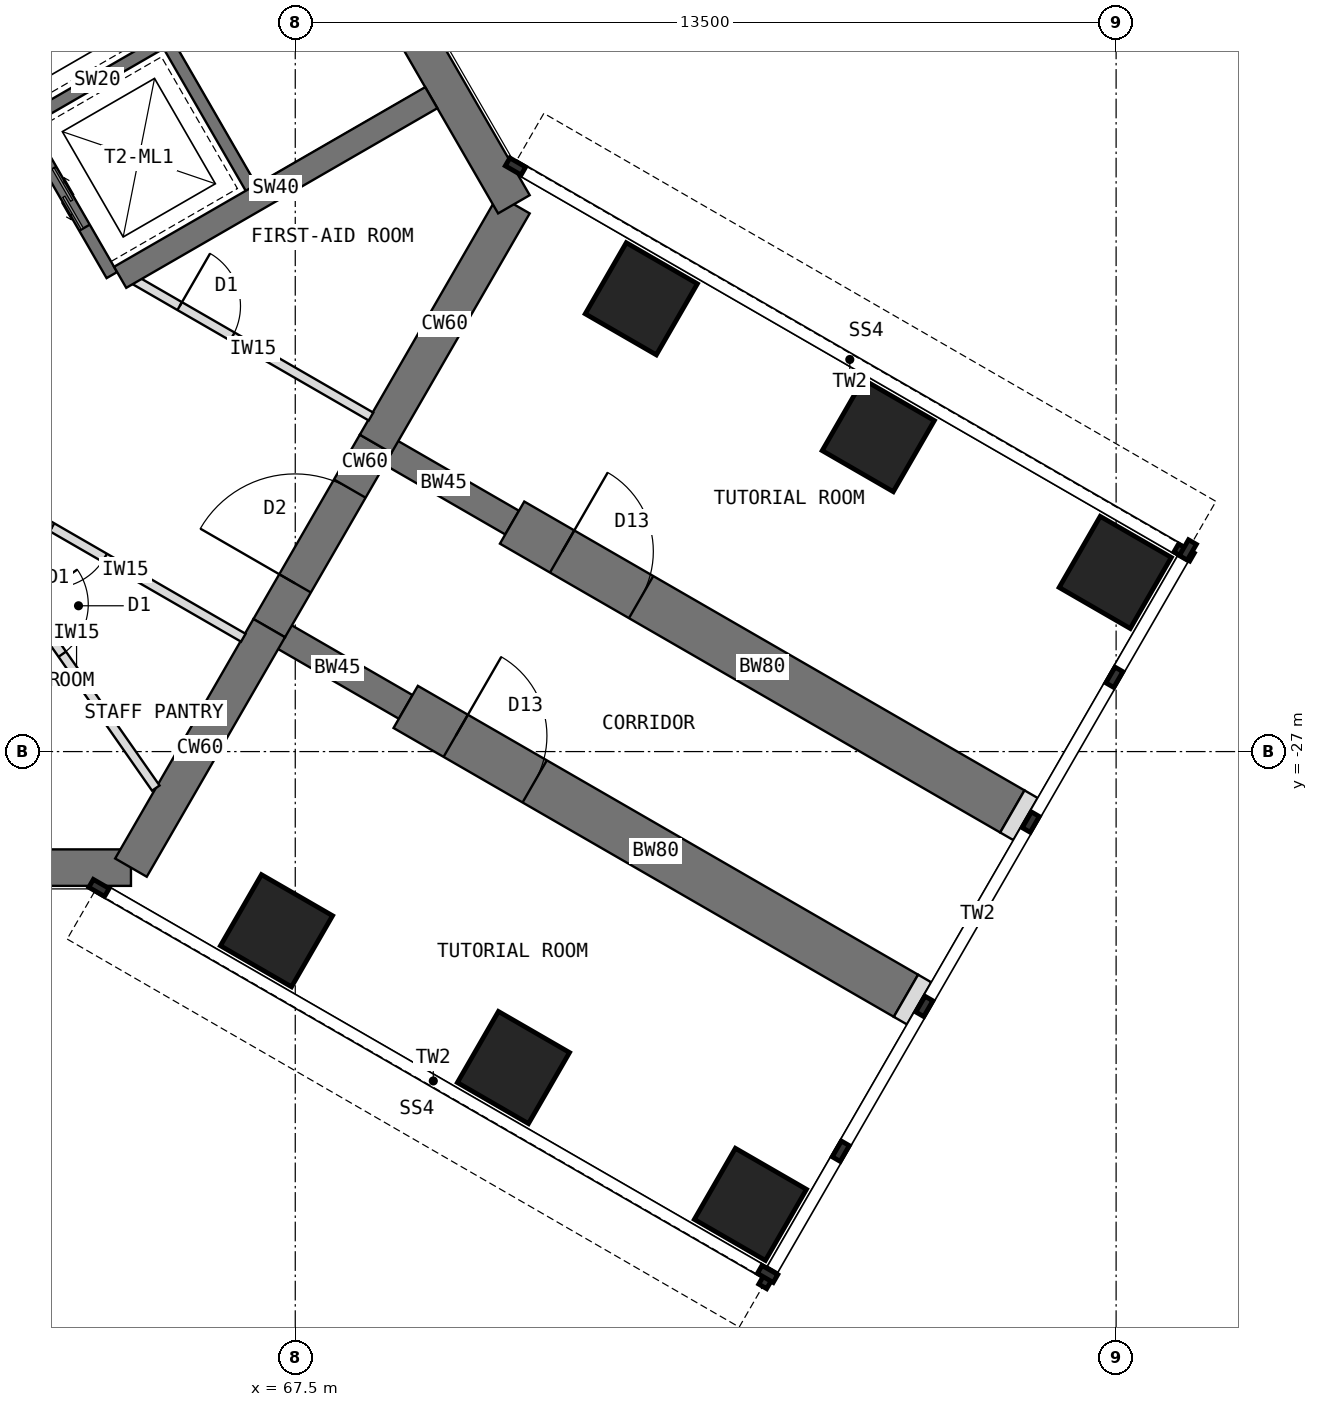
"""IFC4 building model, lengths in metres.
Left out: names, types, materials, properties, quantities, classifications, styles, units other than length and angle.
Written with IfcOpenShell. Run it as: python <this file> out.ifc"""

import sys

from ifc_helpers import new_model, si_unit, direction, frame, frame_2d, origin, origin_2d, place, context, subcontext, project, spatial, rectangle, extrude, element, fill, save


model = new_model("IFC4")
c1 = context("Model", 3, precision=1e-05, world=origin(), true_north=direction((0.0, 1.0)))
c2 = subcontext(c1, "Body", "Model", "MODEL_VIEW")
j1 = project(units=[si_unit("LENGTHUNIT", "METRE"), si_unit("PLANEANGLEUNIT", "RADIAN")], contexts=[c1])
p1 = place(None, origin())
s1 = spatial("IfcSite", under=j1, at=p1, CompositionType="ELEMENT")
p2 = place(p1, origin())
s2 = spatial("IfcBuilding", under=s1, at=p2, CompositionType="ELEMENT")
p3 = place(p2, frame((0.0, 0.0, 113.5)))
s3 = spatial("IfcBuildingStorey", under=s2, at=p3, CompositionType="ELEMENT", Elevation=113.5)
p4 = place(p3, frame((52.202, -28.908, 0.0), z_axis=(0.0, 0.0, 1.0), x_axis=(1.0, 0.0, 0.0)))
e1 = element("IfcWall", 1, at=p4, inside=s3, PredefinedType="SHEAR", context=c2, shape_type="SweptSolid", body=[
    extrude(rectangle(XDim=12.596, YDim=0.6, at=frame_2d((6.298, 0.0))), origin(), (0.0, 0.0, 1.0), 4.0),
])
p5 = place(p3, frame((64.798, -28.908, 0.0), z_axis=(0.0, 0.0, 1.0), x_axis=(0.499984222037, 0.866034513004, 0.0)))
e2 = element("IfcWall", 2, at=p5, inside=s3, PredefinedType="SHEAR", context=c2, shape_type="SweptSolid", body=[
    extrude(rectangle(XDim=4.548, YDim=0.6, at=frame_2d((2.274, 0.0))), origin(), (0.0, 0.0, 1.0), 4.0),
])
p6 = place(p3, frame((67.072, -24.97, 0.0), z_axis=(0.0, 0.0, 1.0), x_axis=(0.500010275428, 0.866019471182, 0.0)))
e3 = element("IfcWall", 3, at=p6, inside=s3, PredefinedType="SHEAR", context=c2, shape_type="SweptSolid", body=[
    extrude(rectangle(XDim=3.5, YDim=0.6, at=frame_2d((1.75, 0.0))), origin(), (0.0, 0.0, 1.0), 4.0),
])
p7 = place(p6, frame((0.85, 0.0, 0.0)))
e4 = element("IfcOpeningElement", 4, at=p7, cuts=e3, PredefinedType="OPENING", context=c2, shape_type="SweptSolid", body=[
    extrude(rectangle(XDim=1.8, YDim=2.1, at=frame_2d((0.9, 1.05))), frame((0.0, 0.31, 0.0), z_axis=(0.0, -1.0, 0.0), x_axis=(1.0, 0.0, 0.0)), (0.0, 0.0, 1.0), 0.62),
])
p8 = place(p3, frame((68.822, -21.939, 0.0), z_axis=(0.0, 0.0, 1.0), x_axis=(0.500024481964, 0.866011268655, 0.0)))
e5 = element("IfcWall", 5, at=p8, inside=s3, PredefinedType="SHEAR", context=c2, shape_type="SweptSolid", body=[
    extrude(rectangle(XDim=4.548, YDim=0.6, at=frame_2d((2.274, 0.0))), origin(), (0.0, 0.0, 1.0), 4.0),
])
p9 = place(p3, frame((71.096, -18.0, 0.0), z_axis=(0.0, 0.0, 1.0), x_axis=(-0.500005998175, 0.866021940709, 0.0)))
e6 = element("IfcWall", 6, at=p9, inside=s3, PredefinedType="SHEAR", context=c2, shape_type="SweptSolid", body=[
    extrude(rectangle(XDim=12.596, YDim=0.6, at=frame_2d((6.298, 0.0))), origin(), (0.0, 0.0, 1.0), 4.0),
])
p10 = place(p3, frame((68.822, -21.939, 0.0), z_axis=(0.0, 0.0, 1.0), x_axis=(0.866072649678, -0.499918158782, 0.0)))
e7 = element("IfcWall", 7, at=p10, inside=s3, PredefinedType="SHEAR", context=c2, shape_type="SweptSolid", body=[
    extrude(rectangle(XDim=2.592, YDim=0.45, at=frame_2d((1.296, 0.0))), origin(), (0.0, 0.0, 1.0), 4.0),
])
p11 = place(p3, frame((71.066, -23.234, 0.0), z_axis=(0.0, 0.0, 1.0), x_axis=(0.86602681393, -0.499997557548, 0.0)))
e8 = element("IfcWall", 8, at=p11, inside=s3, PredefinedType="SHEAR", context=c2, shape_type="SweptSolid", body=[
    extrude(rectangle(XDim=9.5, YDim=0.8, at=frame_2d((4.75, 0.0))), origin(), (0.0, 0.0, 1.0), 4.0),
])
p12 = place(p11, frame((0.95, 0.0, 0.0)))
e9 = element("IfcOpeningElement", 9, at=p12, cuts=e8, PredefinedType="OPENING", context=c2, shape_type="SweptSolid", body=[
    extrude(rectangle(XDim=1.5, YDim=2.1, at=frame_2d((0.75, 1.05))), frame((0.0, 0.41, 0.0), z_axis=(0.0, -1.0, 0.0), x_axis=(1.0, 0.0, 0.0)), (0.0, 0.0, 1.0), 0.82),
])
p13 = place(p3, frame((67.072, -24.97, 0.0), z_axis=(0.0, 0.0, 1.0), x_axis=(0.866031863473, -0.499988811324, 0.0)))
e10 = element("IfcWall", 10, at=p13, inside=s3, PredefinedType="SHEAR", context=c2, shape_type="SweptSolid", body=[
    extrude(rectangle(XDim=2.592, YDim=0.45, at=frame_2d((1.296, 0.0))), origin(), (0.0, 0.0, 1.0), 4.0),
])
p14 = place(p3, frame((69.316, -26.266, 0.0), z_axis=(0.0, 0.0, 1.0), x_axis=(0.86602681393, -0.499997557548, 0.0)))
e11 = element("IfcWall", 11, at=p14, inside=s3, PredefinedType="SHEAR", context=c2, shape_type="SweptSolid", body=[
    extrude(rectangle(XDim=9.5, YDim=0.8, at=frame_2d((4.75, 0.0))), origin(), (0.0, 0.0, 1.0), 4.0),
])
p15 = place(p14, frame((0.95, 0.0, 0.0)))
e12 = element("IfcOpeningElement", 12, at=p15, cuts=e11, PredefinedType="OPENING", context=c2, shape_type="SweptSolid", body=[
    extrude(rectangle(XDim=1.5, YDim=2.1, at=frame_2d((0.75, 1.05))), frame((0.0, 0.41, 0.0), z_axis=(0.0, -1.0, 0.0), x_axis=(1.0, 0.0, 0.0)), (0.0, 0.0, 1.0), 0.82),
])
for number, where, z_axis, x_axis in (
    (13, (73.191, -19.554, 0.0), (0.0, 0.0, 1.0), (0.5, 0.866, 0.0)),
    (14, (67.191, -29.946, 0.0), (0.0, 0.0, 1.0), (0.5, 0.866, 0.0)),
    (15, (77.088, -21.804, 0.0), (0.0, 0.0, 1.0), (0.5, 0.866, 0.0)),
    (16, (71.088, -32.196, 0.0), (0.0, 0.0, 1.0), (0.5, 0.866, 0.0)),
    (17, (80.986, -24.054, 0.0), (0.0, 0.0, 1.0), (0.5, 0.866, 0.0)),
    (18, (74.986, -34.446, 0.0), (0.0, 0.0, 1.0), (0.5, 0.866, 0.0)),
):
    element("IfcColumn", number, at=place(p3, frame(where, z_axis=z_axis, x_axis=x_axis)), inside=s3, PredefinedType="COLUMN", context=c2, shape_type="SweptSolid", body=[
        extrude(rectangle(XDim=1.35, YDim=1.35, at=origin_2d()), origin(), (0.0, 0.0, 1.0), 4.0),
    ])
for number, where, z_axis, x_axis in (
    (19, (79.294, -27.984, 0.0), (0.0, 0.0, 1.0), (0.866, -0.5, 0.0)),
    (20, (77.544, -31.016, 0.0), (0.0, 0.0, 1.0), (0.866, -0.5, 0.0)),
):
    element("IfcWall", number, at=place(p3, frame(where, z_axis=z_axis, x_axis=x_axis)), inside=s3, PredefinedType="PARTITIONING", context=c2, shape_type="SweptSolid", body=[
        extrude(rectangle(XDim=0.25, YDim=0.8, at=frame_2d((0.125, 0.0))), origin(), (0.0, 0.0, 1.0), 3.8),
    ])
p16 = place(p3, frame((64.484, -19.164, 0.0), z_axis=(0.0, 0.0, 1.0), x_axis=(-0.49999894854, 0.866026010844, 0.0)))
e21 = element("IfcWall", 21, at=p16, inside=s3, PredefinedType="SHEAR", context=c2, shape_type="SweptSolid", body=[
    extrude(rectangle(XDim=8.0, YDim=0.2, at=frame_2d((4.0, 0.0))), origin(), (0.0, 0.0, 1.0), 4.0),
])
p17 = place(p16, frame((6.3, 0.0, 0.0)))
e22 = element("IfcOpeningElement", 22, at=p17, cuts=e21, PredefinedType="OPENING", context=c2, shape_type="SweptSolid", body=[
    extrude(rectangle(XDim=1.2, YDim=2.1, at=frame_2d((0.6, 1.05))), frame((0.0, 0.11, 0.0), z_axis=(0.0, -1.0, 0.0), x_axis=(1.0, 0.0, 0.0)), (0.0, 0.0, 1.0), 0.22),
])
p18 = place(p16, frame((0.9, 0.0, 0.0)))
e23 = element("IfcOpeningElement", 23, at=p18, cuts=e21, PredefinedType="OPENING", context=c2, shape_type="SweptSolid", body=[
    extrude(rectangle(XDim=1.1, YDim=2.2, at=frame_2d((0.55, 1.1))), frame((0.0, 0.11, 0.0), z_axis=(0.0, -1.0, 0.0), x_axis=(1.0, 0.0, 0.0)), (0.0, 0.0, 1.0), 0.22),
])
p19 = place(p16, frame((3.8, 0.0, 0.0)))
e24 = element("IfcOpeningElement", 24, at=p19, cuts=e21, PredefinedType="OPENING", context=c2, shape_type="SweptSolid", body=[
    extrude(rectangle(XDim=1.1, YDim=2.2, at=frame_2d((0.55, 1.1))), frame((0.0, 0.11, 0.0), z_axis=(0.0, -1.0, 0.0), x_axis=(1.0, 0.0, 0.0)), (0.0, 0.0, 1.0), 0.22),
])
p20 = place(p3, frame((63.12, -16.603, 0.0), z_axis=(0.0, 0.0, 1.0), x_axis=(0.866062058628, 0.499936506574, 0.0)))
e25 = element("IfcWall", 25, at=p20, inside=s3, PredefinedType="SHEAR", context=c2, shape_type="SweptSolid", body=[
    extrude(rectangle(XDim=2.6, YDim=0.2, at=frame_2d((1.3, 0.0))), origin(), (0.0, 0.0, 1.0), 4.0),
])
p21 = place(p3, frame((66.822, -17.814, 0.0), z_axis=(0.0, 0.0, 1.0), x_axis=(-0.49999894854, 0.866026010844, 0.0)))
e26 = element("IfcWall", 26, at=p21, inside=s3, PredefinedType="SHEAR", context=c2, shape_type="SweptSolid", body=[
    extrude(rectangle(XDim=8.0, YDim=0.2, at=frame_2d((4.0, 0.0))), origin(), (0.0, 0.0, 1.0), 4.0),
])
p22 = place(p21, frame((6.7, 0.0, 0.0)))
e27 = element("IfcOpeningElement", 27, at=p22, cuts=e26, PredefinedType="OPENING", context=c2, shape_type="SweptSolid", body=[
    extrude(rectangle(XDim=1.1, YDim=2.1, at=frame_2d((0.55, 1.05))), frame((0.0, 0.11, 0.0), z_axis=(0.0, -1.0, 0.0), x_axis=(1.0, 0.0, 0.0)), (0.0, 0.0, 1.0), 0.22),
])
p23 = place(p3, frame((64.62, -19.201, 0.0), z_axis=(0.0, 0.0, 1.0), x_axis=(0.866027317282, 0.49999668571, 0.0)))
e28 = element("IfcWall", 28, at=p23, inside=s3, PredefinedType="SHEAR", context=c2, shape_type="SweptSolid", body=[
    extrude(rectangle(XDim=5.908, YDim=0.4, at=frame_2d((2.954, 0.0))), origin(), (0.0, 0.0, 1.0), 4.0),
])
p24 = place(p3, frame((64.87, -19.253, 0.0), z_axis=(0.0, 0.0, 1.0), x_axis=(0.866025707867, -0.499999473313, 0.0)))
e29 = element("IfcWall", 29, at=p24, inside=s3, PredefinedType="PARTITIONING", context=c2, shape_type="SweptSolid", body=[
    extrude(rectangle(XDim=4.476, YDim=0.15, at=frame_2d((2.238, 0.0))), origin(), (0.0, 0.0, 1.0), 3.8),
])
p25 = place(p24, frame((0.843, 0.0, 0.0)))
e30 = element("IfcOpeningElement", 30, at=p25, cuts=e29, PredefinedType="OPENING", context=c2, shape_type="SweptSolid", body=[
    extrude(rectangle(XDim=1.0, YDim=2.1, at=frame_2d((0.5, 1.05))), frame((0.0, 0.085, 0.0), z_axis=(0.0, -1.0, 0.0), x_axis=(1.0, 0.0, 0.0)), (0.0, 0.0, 1.0), 0.17),
])
p26 = place(p3, frame((66.646, -25.128, 0.0), z_axis=(0.0, 0.0, 1.0), x_axis=(-0.866025707867, 0.499999473313, 0.0)))
e31 = element("IfcWall", 31, at=p26, inside=s3, PredefinedType="PARTITIONING", context=c2, shape_type="SweptSolid", body=[
    extrude(rectangle(XDim=4.476, YDim=0.15, at=frame_2d((2.238, 0.0))), origin(), (0.0, 0.0, 1.0), 3.8),
])
p27 = place(p26, frame((2.633, 0.0, 0.0)))
e32 = element("IfcOpeningElement", 32, at=p27, cuts=e31, PredefinedType="OPENING", context=c2, shape_type="SweptSolid", body=[
    extrude(rectangle(XDim=1.0, YDim=2.1, at=frame_2d((0.5, 1.05))), frame((0.0, 0.085, 0.0), z_axis=(0.0, -1.0, 0.0), x_axis=(1.0, 0.0, 0.0)), (0.0, 0.0, 1.0), 0.17),
])
p28 = place(p3, frame((62.6, -23.869, 0.0), z_axis=(0.0, 0.0, 1.0), x_axis=(0.572666465836, -0.819788459852, 0.0)))
e33 = element("IfcWall", 33, at=p28, inside=s3, PredefinedType="PARTITIONING", context=c2, shape_type="SweptSolid", body=[
    extrude(rectangle(XDim=4.552, YDim=0.15, at=frame_2d((2.276, 0.0))), origin(), (0.0, 0.0, 1.0), 3.8),
])
p29 = place(p28, frame((0.865, 0.0, 0.0)))
e34 = element("IfcOpeningElement", 34, at=p29, cuts=e33, PredefinedType="OPENING", context=c2, shape_type="SweptSolid", body=[
    extrude(rectangle(XDim=1.0, YDim=2.1, at=frame_2d((0.5, 1.05))), frame((0.0, 0.085, 0.0), z_axis=(0.0, -1.0, 0.0), x_axis=(1.0, 0.0, 0.0)), (0.0, 0.0, 1.0), 0.17),
])
p30 = place(p18, origin())
e35 = element("IfcDoor", 35, at=p30, inside=s3, OperationType="DOUBLE_DOOR_SLIDING", PredefinedType="DOOR", context=c2, shape_type="SweptSolid", body=[
    extrude(rectangle(XDim=1.1, YDim=2.2, at=frame_2d((0.55, 1.1))), frame((0.0, 0.025, 0.0), z_axis=(0.0, -1.0, 0.0), x_axis=(1.0, 0.0, 0.0)), (0.0, 0.0, 1.0), 0.05),
])
fill(e23, e35)
p31 = place(p7, origin())
e36 = element("IfcDoor", 36, at=p31, inside=s3, OperationType="DOUBLE_DOOR_DOUBLE_SWING", PredefinedType="DOOR", context=c2, shape_type="SweptSolid", body=[
    extrude(rectangle(XDim=1.72, YDim=2.06, at=frame_2d((0.9, 1.03))), frame((0.0, 0.025, 0.0), z_axis=(0.0, -1.0, 0.0), x_axis=(1.0, 0.0, 0.0)), (0.0, 0.0, 1.0), 0.05),
    extrude(rectangle(XDim=0.04, YDim=2.1, at=frame_2d((0.02, 1.05))), frame((0.0, 0.3, 0.0), z_axis=(0.0, -1.0, 0.0), x_axis=(1.0, 0.0, 0.0)), (0.0, 0.0, 1.0), 0.6),
    extrude(rectangle(XDim=0.04, YDim=2.1, at=frame_2d((1.78, 1.05))), frame((0.0, 0.3, 0.0), z_axis=(0.0, -1.0, 0.0), x_axis=(1.0, 0.0, 0.0)), (0.0, 0.0, 1.0), 0.6),
    extrude(rectangle(XDim=1.72, YDim=0.04, at=frame_2d((0.9, 2.08))), frame((0.0, 0.3, 0.0), z_axis=(0.0, -1.0, 0.0), x_axis=(1.0, 0.0, 0.0)), (0.0, 0.0, 1.0), 0.6),
])
fill(e4, e36)
p32 = place(p29, origin())
e37 = element("IfcDoor", 37, at=p32, inside=s3, OperationType="SINGLE_SWING_LEFT", PredefinedType="DOOR", context=c2, shape_type="SweptSolid", body=[
    extrude(rectangle(XDim=1.0, YDim=2.1, at=frame_2d((0.5, 1.05))), frame((0.0, 0.025, 0.0), z_axis=(0.0, -1.0, 0.0), x_axis=(1.0, 0.0, 0.0)), (0.0, 0.0, 1.0), 0.05),
])
fill(e34, e37)
p33 = place(p27, origin())
e38 = element("IfcDoor", 38, at=p33, inside=s3, OperationType="SINGLE_SWING_RIGHT", PredefinedType="DOOR", context=c2, shape_type="SweptSolid", body=[
    extrude(rectangle(XDim=1.0, YDim=2.1, at=frame_2d((0.5, 1.05))), frame((0.0, 0.025, 0.0), z_axis=(0.0, -1.0, 0.0), x_axis=(1.0, 0.0, 0.0)), (0.0, 0.0, 1.0), 0.05),
])
fill(e32, e38)
p34 = place(p25, origin())
e39 = element("IfcDoor", 39, at=p34, inside=s3, OperationType="SINGLE_SWING_LEFT", PredefinedType="DOOR", context=c2, shape_type="SweptSolid", body=[
    extrude(rectangle(XDim=1.0, YDim=2.1, at=frame_2d((0.5, 1.05))), frame((0.0, 0.025, 0.0), z_axis=(0.0, -1.0, 0.0), x_axis=(1.0, 0.0, 0.0)), (0.0, 0.0, 1.0), 0.05),
])
fill(e30, e39)
p35 = place(p12, origin())
e40 = element("IfcDoor", 40, at=p35, inside=s3, OperationType="DOUBLE_DOOR_SINGLE_SWING", PredefinedType="DOOR", context=c2, shape_type="SweptSolid", body=[
    extrude(rectangle(XDim=1.42, YDim=2.06, at=frame_2d((0.75, 1.03))), frame((0.0, 0.025, 0.0), z_axis=(0.0, -1.0, 0.0), x_axis=(1.0, 0.0, 0.0)), (0.0, 0.0, 1.0), 0.05),
    extrude(rectangle(XDim=0.04, YDim=2.1, at=frame_2d((0.02, 1.05))), frame((0.0, 0.4, 0.0), z_axis=(0.0, -1.0, 0.0), x_axis=(1.0, 0.0, 0.0)), (0.0, 0.0, 1.0), 0.8),
    extrude(rectangle(XDim=0.04, YDim=2.1, at=frame_2d((1.48, 1.05))), frame((0.0, 0.4, 0.0), z_axis=(0.0, -1.0, 0.0), x_axis=(1.0, 0.0, 0.0)), (0.0, 0.0, 1.0), 0.8),
    extrude(rectangle(XDim=1.42, YDim=0.04, at=frame_2d((0.75, 2.08))), frame((0.0, 0.4, 0.0), z_axis=(0.0, -1.0, 0.0), x_axis=(1.0, 0.0, 0.0)), (0.0, 0.0, 1.0), 0.8),
])
fill(e9, e40)
p36 = place(p15, origin())
e41 = element("IfcDoor", 41, at=p36, inside=s3, OperationType="DOUBLE_DOOR_SINGLE_SWING", PredefinedType="DOOR", context=c2, shape_type="SweptSolid", body=[
    extrude(rectangle(XDim=1.42, YDim=2.06, at=frame_2d((0.75, 1.03))), frame((0.0, 0.025, 0.0), z_axis=(0.0, -1.0, 0.0), x_axis=(1.0, 0.0, 0.0)), (0.0, 0.0, 1.0), 0.05),
    extrude(rectangle(XDim=0.04, YDim=2.1, at=frame_2d((0.02, 1.05))), frame((0.0, 0.4, 0.0), z_axis=(0.0, -1.0, 0.0), x_axis=(1.0, 0.0, 0.0)), (0.0, 0.0, 1.0), 0.8),
    extrude(rectangle(XDim=0.04, YDim=2.1, at=frame_2d((1.48, 1.05))), frame((0.0, 0.4, 0.0), z_axis=(0.0, -1.0, 0.0), x_axis=(1.0, 0.0, 0.0)), (0.0, 0.0, 1.0), 0.8),
    extrude(rectangle(XDim=1.42, YDim=0.04, at=frame_2d((0.75, 2.08))), frame((0.0, 0.4, 0.0), z_axis=(0.0, -1.0, 0.0), x_axis=(1.0, 0.0, 0.0)), (0.0, 0.0, 1.0), 0.8),
])
fill(e12, e41)
save(model, sys.argv[1])
